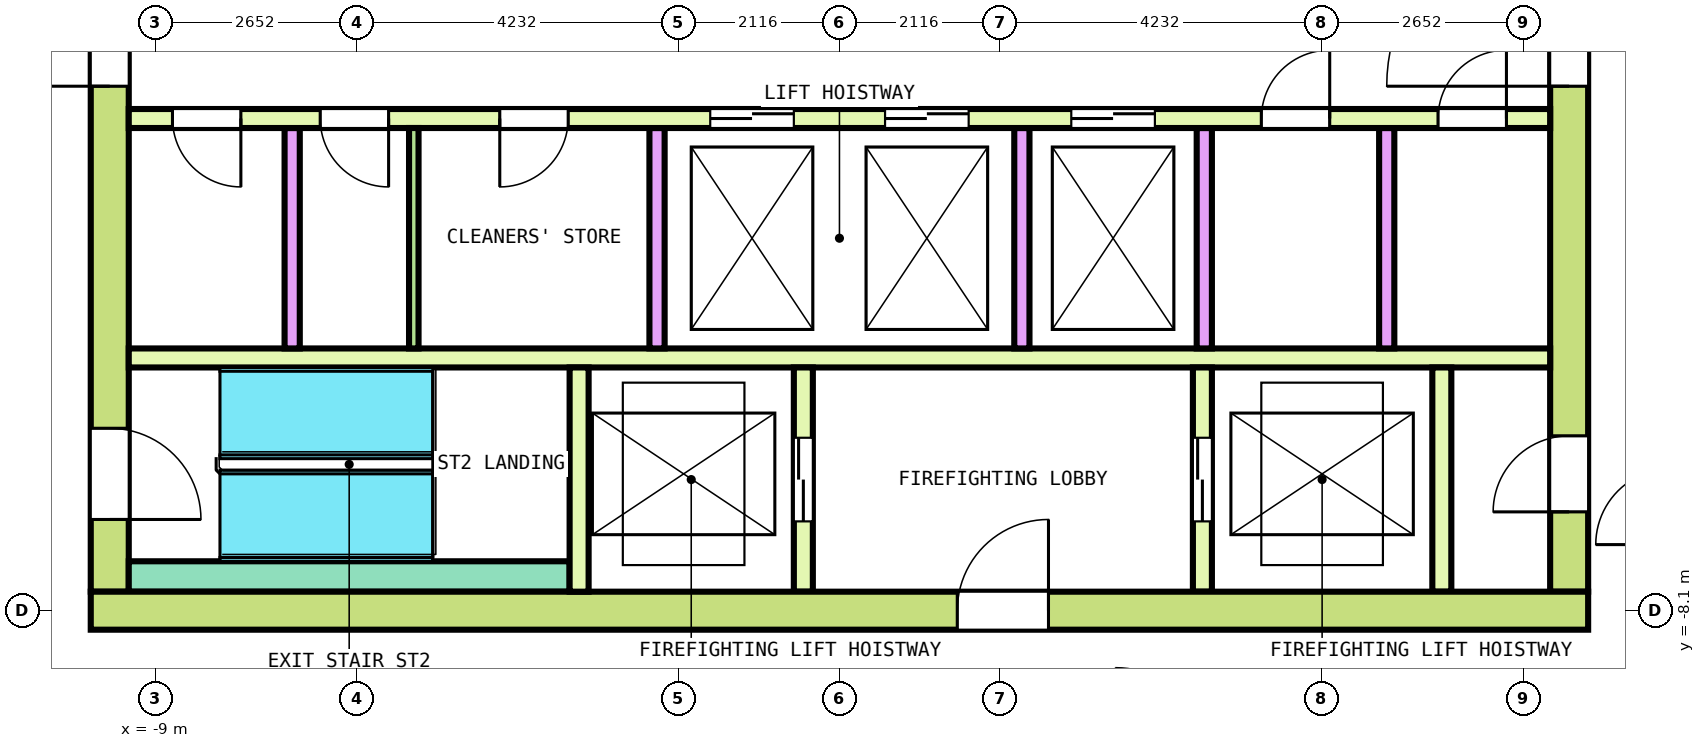
"""IFC4 building model, lengths in metres.
Left out: names, types, materials, properties, quantities, classifications, styles, units other than length and angle.
Written with IfcOpenShell. Run it as: python <this file> out.ifc"""

import sys

from ifc_helpers import new_model, si_unit, direction, frame, frame_2d, origin, place, context, subcontext, project, spatial, rectangle, extrude, element, fill, save


model = new_model("IFC4")
c1 = context("Model", 3, precision=1e-05, world=origin(), true_north=direction((0.0, 1.0)))
c2 = subcontext(c1, "Body", "Model", "MODEL_VIEW")
j1 = project(units=[si_unit("LENGTHUNIT", "METRE"), si_unit("PLANEANGLEUNIT", "RADIAN")], contexts=[c1])
p1 = place(None, origin())
s1 = spatial("IfcSite", under=j1, at=p1, CompositionType="ELEMENT")
p2 = place(p1, origin())
s2 = spatial("IfcBuilding", under=s1, at=p2, CompositionType="ELEMENT")
p3 = place(p2, frame((0.0, 0.0, 263.0)))
s3 = spatial("IfcBuildingStorey", under=s2, at=p3, CompositionType="ELEMENT", Elevation=263.0)
p4 = place(p3, frame((-9.85, -8.1, 0.0), z_axis=(0.0, 0.0, 1.0), x_axis=(1.0, 0.0, 0.0)))
e1 = element("IfcWall", 1, at=p4, inside=s3, PredefinedType="SHEAR", context=c2, shape_type="SweptSolid", body=[
    extrude(rectangle(XDim=19.7, YDim=0.5, at=frame_2d((9.85, 0.0))), origin(), (0.0, 0.0, 1.0), 3.7),
])
p5 = place(p4, frame((11.4, 0.0, 0.0)))
e2 = element("IfcOpeningElement", 2, at=p5, cuts=e1, PredefinedType="OPENING", context=c2, shape_type="SweptSolid", body=[
    extrude(rectangle(XDim=1.2, YDim=2.1, at=frame_2d((0.6, 1.05))), frame((0.0, 0.26, 0.0), z_axis=(0.0, -1.0, 0.0), x_axis=(1.0, 0.0, 0.0)), (0.0, 0.0, 1.0), 0.52),
])
p6 = place(p3, frame((-9.6, -7.85, 0.0), z_axis=(0.0, 0.0, 1.0), x_axis=(0.0, 1.0, 0.0)))
e3 = element("IfcWall", 3, at=p6, inside=s3, PredefinedType="SHEAR", context=c2, shape_type="SweptSolid", body=[
    extrude(rectangle(XDim=15.7, YDim=0.5, at=frame_2d((7.85, 0.0))), origin(), (0.0, 0.0, 1.0), 3.7),
])
p7 = place(p6, frame((6.65, 0.0, 0.0)))
e4 = element("IfcOpeningElement", 4, at=p7, cuts=e3, PredefinedType="OPENING", context=c2, shape_type="SweptSolid", body=[
    extrude(rectangle(XDim=2.4, YDim=2.1, at=frame_2d((1.2, 1.05))), frame((0.0, 0.26, 0.0), z_axis=(0.0, -1.0, 0.0), x_axis=(1.0, 0.0, 0.0)), (0.0, 0.0, 1.0), 0.52),
])
p8 = place(p6, frame((13.55, 0.0, 0.0)))
e5 = element("IfcOpeningElement", 5, at=p8, cuts=e3, PredefinedType="OPENING", context=c2, shape_type="SweptSolid", body=[
    extrude(rectangle(XDim=1.2, YDim=2.1, at=frame_2d((0.6, 1.05))), frame((0.0, 0.26, 0.0), z_axis=(0.0, -1.0, 0.0), x_axis=(1.0, 0.0, 0.0)), (0.0, 0.0, 1.0), 0.52),
])
p9 = place(p6, frame((0.95, 0.0, 0.0)))
e6 = element("IfcOpeningElement", 6, at=p9, cuts=e3, PredefinedType="OPENING", context=c2, shape_type="SweptSolid", body=[
    extrude(rectangle(XDim=1.2, YDim=2.1, at=frame_2d((0.6, 1.05))), frame((0.0, 0.26, 0.0), z_axis=(0.0, -1.0, 0.0), x_axis=(1.0, 0.0, 0.0)), (0.0, 0.0, 1.0), 0.52),
])
p10 = place(p3, frame((9.6, -7.85, 0.0), z_axis=(0.0, 0.0, 1.0), x_axis=(0.0, 1.0, 0.0)))
e7 = element("IfcWall", 7, at=p10, inside=s3, PredefinedType="SHEAR", context=c2, shape_type="SweptSolid", body=[
    extrude(rectangle(XDim=15.7, YDim=0.5, at=frame_2d((7.85, 0.0))), origin(), (0.0, 0.0, 1.0), 3.7),
])
p11 = place(p10, frame((6.65, 0.0, 0.0)))
e8 = element("IfcOpeningElement", 8, at=p11, cuts=e7, PredefinedType="OPENING", context=c2, shape_type="SweptSolid", body=[
    extrude(rectangle(XDim=2.4, YDim=2.1, at=frame_2d((1.2, 1.05))), frame((0.0, 0.26, 0.0), z_axis=(0.0, -1.0, 0.0), x_axis=(1.0, 0.0, 0.0)), (0.0, 0.0, 1.0), 0.52),
])
p12 = place(p10, frame((13.55, 0.0, 0.0)))
e9 = element("IfcOpeningElement", 9, at=p12, cuts=e7, PredefinedType="OPENING", context=c2, shape_type="SweptSolid", body=[
    extrude(rectangle(XDim=1.2, YDim=2.1, at=frame_2d((0.6, 1.05))), frame((0.0, 0.26, 0.0), z_axis=(0.0, -1.0, 0.0), x_axis=(1.0, 0.0, 0.0)), (0.0, 0.0, 1.0), 0.52),
])
p13 = place(p10, frame((1.05, 0.0, 0.0)))
e10 = element("IfcOpeningElement", 10, at=p13, cuts=e7, PredefinedType="OPENING", context=c2, shape_type="SweptSolid", body=[
    extrude(rectangle(XDim=1.0, YDim=2.1, at=frame_2d((0.5, 1.05))), frame((0.0, 0.26, 0.0), z_axis=(0.0, -1.0, 0.0), x_axis=(1.0, 0.0, 0.0)), (0.0, 0.0, 1.0), 0.52),
])
p14 = place(p3, frame((-9.35, -1.625, 0.0), z_axis=(0.0, 0.0, 1.0), x_axis=(1.0, 0.0, 0.0)))
e11 = element("IfcWall", 11, at=p14, inside=s3, PredefinedType="SOLIDWALL", context=c2, shape_type="SweptSolid", body=[
    extrude(rectangle(XDim=18.7, YDim=0.25, at=frame_2d((9.35, 0.0))), origin(), (0.0, 0.0, 1.0), 3.7),
])
p15 = place(p14, frame((7.65, 0.0, 0.0)))
e12 = element("IfcOpeningElement", 12, at=p15, cuts=e11, PredefinedType="OPENING", context=c2, shape_type="SweptSolid", body=[
    extrude(rectangle(XDim=1.1, YDim=2.1, at=frame_2d((0.55, 1.05))), frame((0.0, 0.135, 0.0), z_axis=(0.0, -1.0, 0.0), x_axis=(1.0, 0.0, 0.0)), (0.0, 0.0, 1.0), 0.27),
])
p16 = place(p14, frame((9.95, 0.0, 0.0)))
e13 = element("IfcOpeningElement", 13, at=p16, cuts=e11, PredefinedType="OPENING", context=c2, shape_type="SweptSolid", body=[
    extrude(rectangle(XDim=1.1, YDim=2.1, at=frame_2d((0.55, 1.05))), frame((0.0, 0.135, 0.0), z_axis=(0.0, -1.0, 0.0), x_axis=(1.0, 0.0, 0.0)), (0.0, 0.0, 1.0), 0.27),
])
p17 = place(p14, frame((12.4, 0.0, 0.0)))
e14 = element("IfcOpeningElement", 14, at=p17, cuts=e11, PredefinedType="OPENING", context=c2, shape_type="SweptSolid", body=[
    extrude(rectangle(XDim=1.1, YDim=2.1, at=frame_2d((0.55, 1.05))), frame((0.0, 0.135, 0.0), z_axis=(0.0, -1.0, 0.0), x_axis=(1.0, 0.0, 0.0)), (0.0, 0.0, 1.0), 0.27),
])
p18 = place(p14, frame((0.575, 0.0, 0.0)))
e15 = element("IfcOpeningElement", 15, at=p18, cuts=e11, PredefinedType="OPENING", context=c2, shape_type="SweptSolid", body=[
    extrude(rectangle(XDim=0.9, YDim=2.1, at=frame_2d((0.45, 1.05))), frame((0.0, 0.135, 0.0), z_axis=(0.0, -1.0, 0.0), x_axis=(1.0, 0.0, 0.0)), (0.0, 0.0, 1.0), 0.27),
])
p19 = place(p14, frame((2.519, 0.0, 0.0)))
e16 = element("IfcOpeningElement", 16, at=p19, cuts=e11, PredefinedType="OPENING", context=c2, shape_type="SweptSolid", body=[
    extrude(rectangle(XDim=0.9, YDim=2.1, at=frame_2d((0.45, 1.05))), frame((0.0, 0.135, 0.0), z_axis=(0.0, -1.0, 0.0), x_axis=(1.0, 0.0, 0.0)), (0.0, 0.0, 1.0), 0.27),
])
p20 = place(p14, frame((4.881, 0.0, 0.0)))
e17 = element("IfcOpeningElement", 17, at=p20, cuts=e11, PredefinedType="OPENING", context=c2, shape_type="SweptSolid", body=[
    extrude(rectangle(XDim=0.9, YDim=2.1, at=frame_2d((0.45, 1.05))), frame((0.0, 0.135, 0.0), z_axis=(0.0, -1.0, 0.0), x_axis=(1.0, 0.0, 0.0)), (0.0, 0.0, 1.0), 0.27),
])
p21 = place(p14, frame((14.9, 0.0, 0.0)))
e18 = element("IfcOpeningElement", 18, at=p21, cuts=e11, PredefinedType="OPENING", context=c2, shape_type="SweptSolid", body=[
    extrude(rectangle(XDim=0.9, YDim=2.1, at=frame_2d((0.45, 1.05))), frame((0.0, 0.135, 0.0), z_axis=(0.0, -1.0, 0.0), x_axis=(1.0, 0.0, 0.0)), (0.0, 0.0, 1.0), 0.27),
])
p22 = place(p14, frame((17.225, 0.0, 0.0)))
e19 = element("IfcOpeningElement", 19, at=p22, cuts=e11, PredefinedType="OPENING", context=c2, shape_type="SweptSolid", body=[
    extrude(rectangle(XDim=0.9, YDim=2.1, at=frame_2d((0.45, 1.05))), frame((0.0, 0.135, 0.0), z_axis=(0.0, -1.0, 0.0), x_axis=(1.0, 0.0, 0.0)), (0.0, 0.0, 1.0), 0.27),
])
p23 = place(p3, frame((-9.35, -4.775, 0.0), z_axis=(0.0, 0.0, 1.0), x_axis=(1.0, 0.0, 0.0)))
e20 = element("IfcWall", 20, at=p23, inside=s3, PredefinedType="SOLIDWALL", context=c2, shape_type="SweptSolid", body=[
    extrude(rectangle(XDim=18.7, YDim=0.25, at=frame_2d((9.35, 0.0))), origin(), (0.0, 0.0, 1.0), 3.7),
])
for number, where, z_axis, x_axis in (
    (21, (-7.2, -4.65, 0.0), (0.0, 0.0, 1.0), (0.0, 1.0, 0.0)),
    (22, (-2.4, -4.65, 0.0), (0.0, 0.0, 1.0), (0.0, 1.0, 0.0)),
    (23, (2.4, -4.65, 0.0), (0.0, 0.0, 1.0), (0.0, 1.0, 0.0)),
    (24, (4.8, -4.65, 0.0), (0.0, 0.0, 1.0), (0.0, 1.0, 0.0)),
    (25, (7.2, -4.65, 0.0), (0.0, 0.0, 1.0), (0.0, 1.0, 0.0)),
):
    element("IfcWall", number, at=place(p3, frame(where, z_axis=z_axis, x_axis=x_axis)), inside=s3, PredefinedType="SOLIDWALL", context=c2, shape_type="SweptSolid", body=[
        extrude(rectangle(XDim=2.9, YDim=0.2, at=frame_2d((1.45, 0.0))), origin(), (0.0, 0.0, 1.0), 3.7),
    ])
p24 = place(p3, frame((-9.35, -7.65, 0.0), z_axis=(0.0, 0.0, 1.0), x_axis=(1.0, 0.0, 0.0)))
e26 = element("IfcWall", 26, at=p24, inside=s3, PredefinedType="SOLIDWALL", context=c2, shape_type="SweptSolid", body=[
    extrude(rectangle(XDim=5.8, YDim=0.4, at=frame_2d((2.9, 0.0))), origin(), (0.0, 0.0, 1.0), 3.7),
])
p25 = place(p3, frame((-3.425, -7.85, 0.0), z_axis=(0.0, 0.0, 1.0), x_axis=(0.0, 1.0, 0.0)))
e27 = element("IfcWall", 27, at=p25, inside=s3, PredefinedType="SOLIDWALL", context=c2, shape_type="SweptSolid", body=[
    extrude(rectangle(XDim=2.95, YDim=0.25, at=frame_2d((1.475, 0.0))), origin(), (0.0, 0.0, 1.0), 3.7),
])
p26 = place(p3, frame((-0.475, -7.85, 0.0), z_axis=(0.0, 0.0, 1.0), x_axis=(0.0, 1.0, 0.0)))
e28 = element("IfcWall", 28, at=p26, inside=s3, PredefinedType="SOLIDWALL", context=c2, shape_type="SweptSolid", body=[
    extrude(rectangle(XDim=2.95, YDim=0.25, at=frame_2d((1.475, 0.0))), origin(), (0.0, 0.0, 1.0), 3.7),
])
p27 = place(p26, frame((0.925, 0.0, 0.0)))
e29 = element("IfcOpeningElement", 29, at=p27, cuts=e28, PredefinedType="OPENING", context=c2, shape_type="SweptSolid", body=[
    extrude(rectangle(XDim=1.1, YDim=2.1, at=frame_2d((0.55, 1.05))), frame((0.0, 0.135, 0.0), z_axis=(0.0, -1.0, 0.0), x_axis=(1.0, 0.0, 0.0)), (0.0, 0.0, 1.0), 0.27),
])
p28 = place(p3, frame((4.775, -7.85, 0.0), z_axis=(0.0, 0.0, 1.0), x_axis=(0.0, 1.0, 0.0)))
e30 = element("IfcWall", 30, at=p28, inside=s3, PredefinedType="SOLIDWALL", context=c2, shape_type="SweptSolid", body=[
    extrude(rectangle(XDim=2.95, YDim=0.25, at=frame_2d((1.475, 0.0))), origin(), (0.0, 0.0, 1.0), 3.7),
])
p29 = place(p28, frame((0.925, 0.0, 0.0)))
e31 = element("IfcOpeningElement", 31, at=p29, cuts=e30, PredefinedType="OPENING", context=c2, shape_type="SweptSolid", body=[
    extrude(rectangle(XDim=1.1, YDim=2.1, at=frame_2d((0.55, 1.05))), frame((0.0, 0.135, 0.0), z_axis=(0.0, -1.0, 0.0), x_axis=(1.0, 0.0, 0.0)), (0.0, 0.0, 1.0), 0.27),
])
p30 = place(p3, frame((7.925, -7.85, 0.0), z_axis=(0.0, 0.0, 1.0), x_axis=(0.0, 1.0, 0.0)))
e32 = element("IfcWall", 32, at=p30, inside=s3, PredefinedType="SOLIDWALL", context=c2, shape_type="SweptSolid", body=[
    extrude(rectangle(XDim=2.95, YDim=0.25, at=frame_2d((1.475, 0.0))), origin(), (0.0, 0.0, 1.0), 3.7),
])
p31 = place(p3, frame((-5.6, -4.65, 0.0), z_axis=(0.0, 0.0, 1.0), x_axis=(0.0, 1.0, 0.0)))
e33 = element("IfcWall", 33, at=p31, inside=s3, PredefinedType="PARTITIONING", context=c2, shape_type="SweptSolid", body=[
    extrude(rectangle(XDim=2.9, YDim=0.125, at=frame_2d((1.45, 0.0))), origin(), (0.0, 0.0, 1.0), 3.7),
])
p32 = place(p15, origin())
e34 = element("IfcDoor", 34, at=p32, inside=s3, OperationType="DOUBLE_DOOR_SLIDING", PredefinedType="DOOR", context=c2, shape_type="SweptSolid", body=[
    extrude(rectangle(XDim=1.1, YDim=2.1, at=frame_2d((0.55, 1.05))), frame((0.0, 0.075, 0.0), z_axis=(0.0, -1.0, 0.0), x_axis=(1.0, 0.0, 0.0)), (0.0, 0.0, 1.0), 0.15),
])
fill(e12, e34)
p33 = place(p16, origin())
e35 = element("IfcDoor", 35, at=p33, inside=s3, OperationType="DOUBLE_DOOR_SLIDING", PredefinedType="DOOR", context=c2, shape_type="SweptSolid", body=[
    extrude(rectangle(XDim=1.1, YDim=2.1, at=frame_2d((0.55, 1.05))), frame((0.0, 0.075, 0.0), z_axis=(0.0, -1.0, 0.0), x_axis=(1.0, 0.0, 0.0)), (0.0, 0.0, 1.0), 0.15),
])
fill(e13, e35)
p34 = place(p17, origin())
e36 = element("IfcDoor", 36, at=p34, inside=s3, OperationType="DOUBLE_DOOR_SLIDING", PredefinedType="DOOR", context=c2, shape_type="SweptSolid", body=[
    extrude(rectangle(XDim=1.1, YDim=2.1, at=frame_2d((0.55, 1.05))), frame((0.0, 0.075, 0.0), z_axis=(0.0, -1.0, 0.0), x_axis=(1.0, 0.0, 0.0)), (0.0, 0.0, 1.0), 0.15),
])
fill(e14, e36)
p35 = place(p27, origin())
e37 = element("IfcDoor", 37, at=p35, inside=s3, OperationType="DOUBLE_DOOR_SLIDING", PredefinedType="DOOR", context=c2, shape_type="SweptSolid", body=[
    extrude(rectangle(XDim=1.1, YDim=2.1, at=frame_2d((0.55, 1.05))), frame((0.0, 0.075, 0.0), z_axis=(0.0, -1.0, 0.0), x_axis=(1.0, 0.0, 0.0)), (0.0, 0.0, 1.0), 0.15),
])
fill(e29, e37)
p36 = place(p29, origin())
e38 = element("IfcDoor", 38, at=p36, inside=s3, OperationType="DOUBLE_DOOR_SLIDING", PredefinedType="DOOR", context=c2, shape_type="SweptSolid", body=[
    extrude(rectangle(XDim=1.1, YDim=2.1, at=frame_2d((0.55, 1.05))), frame((0.0, 0.075, 0.0), z_axis=(0.0, -1.0, 0.0), x_axis=(1.0, 0.0, 0.0)), (0.0, 0.0, 1.0), 0.15),
])
fill(e31, e38)
p37 = place(p7, origin())
e39 = element("IfcDoor", 39, at=p37, inside=s3, OperationType="DOUBLE_DOOR_SINGLE_SWING", PredefinedType="DOOR", context=c2, shape_type="SweptSolid", body=[
    extrude(rectangle(XDim=2.4, YDim=2.1, at=frame_2d((1.2, 1.05))), frame((0.0, 0.2, 0.0), z_axis=(0.0, -1.0, 0.0), x_axis=(1.0, 0.0, 0.0)), (0.0, 0.0, 1.0), 0.4),
])
fill(e4, e39)
p38 = place(p11, origin())
e40 = element("IfcDoor", 40, at=p38, inside=s3, OperationType="DOUBLE_DOOR_SINGLE_SWING", PredefinedType="DOOR", context=c2, shape_type="SweptSolid", body=[
    extrude(rectangle(XDim=2.4, YDim=2.1, at=frame_2d((1.2, 1.05))), frame((0.0, 0.2, 0.0), z_axis=(0.0, -1.0, 0.0), x_axis=(1.0, 0.0, 0.0)), (0.0, 0.0, 1.0), 0.4),
])
fill(e8, e40)
p39 = place(p9, origin())
e41 = element("IfcDoor", 41, at=p39, inside=s3, OperationType="SINGLE_SWING_LEFT", PredefinedType="DOOR", context=c2, shape_type="SweptSolid", body=[
    extrude(rectangle(XDim=1.2, YDim=2.1, at=frame_2d((0.6, 1.05))), frame((0.0, 0.2, 0.0), z_axis=(0.0, -1.0, 0.0), x_axis=(1.0, 0.0, 0.0)), (0.0, 0.0, 1.0), 0.4),
])
fill(e6, e41)
p40 = place(p5, origin())
e42 = element("IfcDoor", 42, at=p40, inside=s3, OperationType="SINGLE_SWING_LEFT", PredefinedType="DOOR", context=c2, shape_type="SweptSolid", body=[
    extrude(rectangle(XDim=1.2, YDim=2.1, at=frame_2d((0.6, 1.05))), frame((0.0, 0.2, 0.0), z_axis=(0.0, -1.0, 0.0), x_axis=(1.0, 0.0, 0.0)), (0.0, 0.0, 1.0), 0.4),
])
fill(e2, e42)
p41 = place(p13, origin())
e43 = element("IfcDoor", 43, at=p41, inside=s3, OperationType="SINGLE_SWING_LEFT", PredefinedType="DOOR", context=c2, shape_type="SweptSolid", body=[
    extrude(rectangle(XDim=1.0, YDim=2.1, at=frame_2d((0.5, 1.05))), frame((0.0, 0.2, 0.0), z_axis=(0.0, -1.0, 0.0), x_axis=(1.0, 0.0, 0.0)), (0.0, 0.0, 1.0), 0.4),
])
fill(e10, e43)
p42 = place(p18, origin())
e44 = element("IfcDoor", 44, at=p42, inside=s3, OperationType="SINGLE_SWING_LEFT", PredefinedType="DOOR", context=c2, shape_type="SweptSolid", body=[
    extrude(rectangle(XDim=0.9, YDim=2.1, at=frame_2d((0.45, 1.05))), frame((0.0, 0.075, 0.0), z_axis=(0.0, -1.0, 0.0), x_axis=(1.0, 0.0, 0.0)), (0.0, 0.0, 1.0), 0.15),
])
fill(e15, e44)
p43 = place(p19, origin())
e45 = element("IfcDoor", 45, at=p43, inside=s3, OperationType="SINGLE_SWING_RIGHT", PredefinedType="DOOR", context=c2, shape_type="SweptSolid", body=[
    extrude(rectangle(XDim=0.9, YDim=2.1, at=frame_2d((0.45, 1.05))), frame((0.0, 0.075, 0.0), z_axis=(0.0, -1.0, 0.0), x_axis=(1.0, 0.0, 0.0)), (0.0, 0.0, 1.0), 0.15),
])
fill(e16, e45)
p44 = place(p20, origin())
e46 = element("IfcDoor", 46, at=p44, inside=s3, OperationType="SINGLE_SWING_LEFT", PredefinedType="DOOR", context=c2, shape_type="SweptSolid", body=[
    extrude(rectangle(XDim=0.9, YDim=2.1, at=frame_2d((0.45, 1.05))), frame((0.0, 0.075, 0.0), z_axis=(0.0, -1.0, 0.0), x_axis=(1.0, 0.0, 0.0)), (0.0, 0.0, 1.0), 0.15),
])
fill(e17, e46)
p45 = place(p21, origin())
e47 = element("IfcDoor", 47, at=p45, inside=s3, OperationType="SINGLE_SWING_RIGHT", PredefinedType="DOOR", context=c2, shape_type="SweptSolid", body=[
    extrude(rectangle(XDim=0.9, YDim=2.1, at=frame_2d((0.45, 1.05))), frame((0.0, 0.075, 0.0), z_axis=(0.0, -1.0, 0.0), x_axis=(1.0, 0.0, 0.0)), (0.0, 0.0, 1.0), 0.15),
])
fill(e18, e47)
p46 = place(p22, origin())
e48 = element("IfcDoor", 48, at=p46, inside=s3, OperationType="SINGLE_SWING_LEFT", PredefinedType="DOOR", context=c2, shape_type="SweptSolid", body=[
    extrude(rectangle(XDim=0.9, YDim=2.1, at=frame_2d((0.45, 1.05))), frame((0.0, 0.075, 0.0), z_axis=(0.0, -1.0, 0.0), x_axis=(1.0, 0.0, 0.0)), (0.0, 0.0, 1.0), 0.15),
])
fill(e19, e48)
save(model, sys.argv[1])
